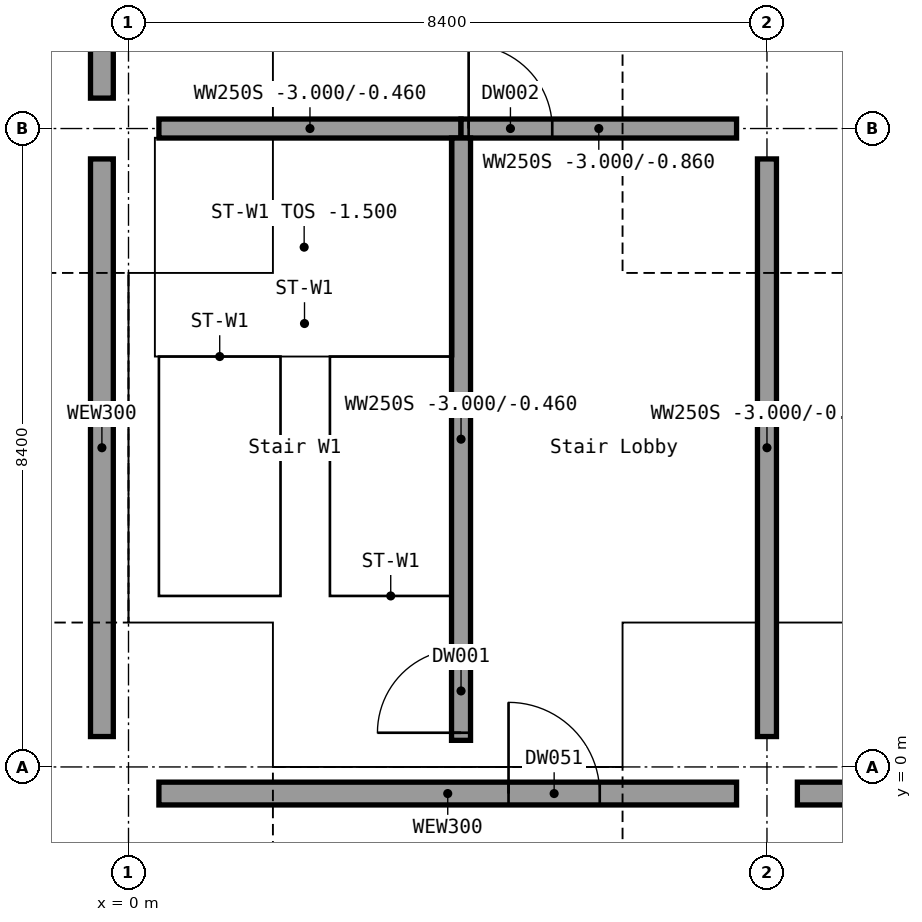
"""IFC4 building model, lengths in metres.
Left out: names, types, materials, properties, quantities, classifications, styles, units other than length and angle.
Written with IfcOpenShell. Run it as: python <this file> out.ifc"""

import sys

from ifc_helpers import new_model, si_unit, direction, frame, frame_2d, origin, origin_2d, place, context, subcontext, project, spatial, rectangle, extrude, element, fill, save


model = new_model("IFC4")
c1 = context("Model", 3, precision=1e-05, world=origin(), true_north=direction((0.0, 1.0)))
c2 = subcontext(c1, "Body", "Model", "MODEL_VIEW")
j1 = project(units=[si_unit("LENGTHUNIT", "METRE"), si_unit("PLANEANGLEUNIT", "RADIAN")], contexts=[c1])
p1 = place(None, origin())
s1 = spatial("IfcSite", under=j1, at=p1, CompositionType="ELEMENT")
p2 = place(p1, origin())
s2 = spatial("IfcBuilding", under=s1, at=p2, CompositionType="ELEMENT")
p3 = place(p2, frame((0.0, 0.0, -3.0)))
s3 = spatial("IfcBuildingStorey", under=s2, at=p3, CompositionType="ELEMENT", Elevation=-3.0)
for number, where, z_axis, x_axis in (
    (1, (0.0, 0.0, 0.0), (0.0, 0.0, 1.0), (1.0, 0.0, 0.0)),
    (2, (0.0, 8.4, 0.0), (0.0, 0.0, 1.0), (1.0, 0.0, 0.0)),
    (3, (8.4, 0.0, 0.0), (0.0, 0.0, 1.0), (1.0, 0.0, 0.0)),
    (4, (8.4, 8.4, 0.0), (0.0, 0.0, 1.0), (1.0, 0.0, 0.0)),
):
    element("IfcColumn", number, at=place(p3, frame(where, z_axis=z_axis, x_axis=x_axis)), inside=s3, PredefinedType="COLUMN", context=c2, shape_type="SweptSolid", body=[
        extrude(rectangle(XDim=0.8, YDim=0.8, at=origin_2d()), origin(), (0.0, 0.0, 1.0), 3.0),
    ])
p4 = place(p3, frame((0.4, -0.35, 0.0), z_axis=(0.0, 0.0, 1.0), x_axis=(1.0, 0.0, 0.0)))
e5 = element("IfcWall", 5, at=p4, inside=s3, PredefinedType="SOLIDWALL", context=c2, shape_type="SweptSolid", body=[
    extrude(rectangle(XDim=7.6, YDim=0.3, at=frame_2d((3.8, 0.0))), origin(), (0.0, 0.0, 1.0), 2.3),
])
p5 = place(p4, frame((4.6, 0.0, 0.0)))
e6 = element("IfcOpeningElement", 6, at=p5, cuts=e5, PredefinedType="OPENING", context=c2, shape_type="SweptSolid", body=[
    extrude(rectangle(XDim=1.2, YDim=2.1, at=frame_2d((0.6, 1.05))), frame((0.0, 0.15, 0.0), z_axis=(0.0, -1.0, 0.0), x_axis=(1.0, 0.0, 0.0)), (0.0, 0.0, 1.0), 0.3),
])
p6 = place(p3, frame((8.8, -0.35, 0.0), z_axis=(0.0, 0.0, 1.0), x_axis=(1.0, 0.0, 0.0)))
e7 = element("IfcWall", 7, at=p6, inside=s3, PredefinedType="SOLIDWALL", context=c2, shape_type="SweptSolid", body=[
    extrude(rectangle(XDim=7.6, YDim=0.3, at=frame_2d((3.8, 0.0))), origin(), (0.0, 0.0, 1.0), 2.3),
])
p7 = place(p3, frame((-0.35, 0.4, 0.0), z_axis=(0.0, 0.0, 1.0), x_axis=(0.0, 1.0, 0.0)))
e8 = element("IfcWall", 8, at=p7, inside=s3, PredefinedType="SOLIDWALL", context=c2, shape_type="SweptSolid", body=[
    extrude(rectangle(XDim=7.6, YDim=0.3, at=frame_2d((3.8, 0.0))), origin(), (0.0, 0.0, 1.0), 2.3),
])
p8 = place(p3, frame((-0.35, 8.8, 0.0), z_axis=(0.0, 0.0, 1.0), x_axis=(0.0, 1.0, 0.0)))
e9 = element("IfcWall", 9, at=p8, inside=s3, PredefinedType="SOLIDWALL", context=c2, shape_type="SweptSolid", body=[
    extrude(rectangle(XDim=7.6, YDim=0.3, at=frame_2d((3.8, 0.0))), origin(), (0.0, 0.0, 1.0), 2.3),
])
p9 = place(p3, frame((0.4, 8.4, 0.0), z_axis=(0.0, 0.0, 1.0), x_axis=(1.0, 0.0, 0.0)))
e10 = element("IfcWall", 10, at=p9, inside=s3, PredefinedType="SHEAR", context=c2, shape_type="SweptSolid", body=[
    extrude(rectangle(XDim=3.975, YDim=0.25, at=frame_2d((1.988, 0.0))), origin(), (0.0, 0.0, 1.0), 2.54),
])
p10 = place(p3, frame((4.375, 8.4, 0.0), z_axis=(0.0, 0.0, 1.0), x_axis=(1.0, 0.0, 0.0)))
e11 = element("IfcWall", 11, at=p10, inside=s3, PredefinedType="SHEAR", context=c2, shape_type="SweptSolid", body=[
    extrude(rectangle(XDim=3.625, YDim=0.25, at=frame_2d((1.812, 0.0))), origin(), (0.0, 0.0, 1.0), 2.14),
])
p11 = place(p10, frame((0.1, 0.0, 0.0)))
e12 = element("IfcOpeningElement", 12, at=p11, cuts=e11, PredefinedType="OPENING", context=c2, shape_type="SweptSolid", body=[
    extrude(rectangle(XDim=1.1, YDim=2.1, at=frame_2d((0.55, 1.05))), frame((0.0, 0.125, 0.0), z_axis=(0.0, -1.0, 0.0), x_axis=(1.0, 0.0, 0.0)), (0.0, 0.0, 1.0), 0.25),
])
p12 = place(p3, frame((4.375, 0.35, 0.0), z_axis=(0.0, 0.0, 1.0), x_axis=(0.0, 1.0, 0.0)))
e13 = element("IfcWall", 13, at=p12, inside=s3, PredefinedType="SHEAR", context=c2, shape_type="SweptSolid", body=[
    extrude(rectangle(XDim=7.925, YDim=0.25, at=frame_2d((3.962, 0.0))), origin(), (0.0, 0.0, 1.0), 2.54),
])
p13 = place(p12, frame((0.1, 0.0, 0.0)))
e14 = element("IfcOpeningElement", 14, at=p13, cuts=e13, PredefinedType="OPENING", context=c2, shape_type="SweptSolid", body=[
    extrude(rectangle(XDim=1.1, YDim=2.1, at=frame_2d((0.55, 1.05))), frame((0.0, 0.125, 0.0), z_axis=(0.0, -1.0, 0.0), x_axis=(1.0, 0.0, 0.0)), (0.0, 0.0, 1.0), 0.25),
])
p14 = place(p3, frame((8.4, 0.4, 0.0), z_axis=(0.0, 0.0, 1.0), x_axis=(0.0, 1.0, 0.0)))
e15 = element("IfcWall", 15, at=p14, inside=s3, PredefinedType="SHEAR", context=c2, shape_type="SweptSolid", body=[
    extrude(rectangle(XDim=7.6, YDim=0.25, at=frame_2d((3.8, 0.0))), origin(), (0.0, 0.0, 1.0), 2.14),
])
p15 = place(p5, origin())
e16 = element("IfcDoor", 16, at=p15, inside=s3, OperationType="SINGLE_SWING_LEFT", PredefinedType="DOOR", context=c2, shape_type="SweptSolid", body=[
    extrude(rectangle(XDim=1.2, YDim=2.1, at=frame_2d((0.6, 1.05))), frame((0.0, 0.025, 0.0), z_axis=(0.0, -1.0, 0.0), x_axis=(1.0, 0.0, 0.0)), (0.0, 0.0, 1.0), 0.05),
])
fill(e6, e16)
p16 = place(p13, origin())
e17 = element("IfcDoor", 17, at=p16, inside=s3, OperationType="SINGLE_SWING_LEFT", PredefinedType="DOOR", context=c2, shape_type="SweptSolid", body=[
    extrude(rectangle(XDim=1.1, YDim=2.1, at=frame_2d((0.55, 1.05))), frame((0.0, 0.025, 0.0), z_axis=(0.0, -1.0, 0.0), x_axis=(1.0, 0.0, 0.0)), (0.0, 0.0, 1.0), 0.05),
])
fill(e14, e17)
p17 = place(p11, origin())
e18 = element("IfcDoor", 18, at=p17, inside=s3, OperationType="SINGLE_SWING_LEFT", PredefinedType="DOOR", context=c2, shape_type="SweptSolid", body=[
    extrude(rectangle(XDim=1.1, YDim=2.1, at=frame_2d((0.55, 1.05))), frame((0.0, 0.025, 0.0), z_axis=(0.0, -1.0, 0.0), x_axis=(1.0, 0.0, 0.0)), (0.0, 0.0, 1.0), 0.05),
])
fill(e12, e18)
save(model, sys.argv[1])
